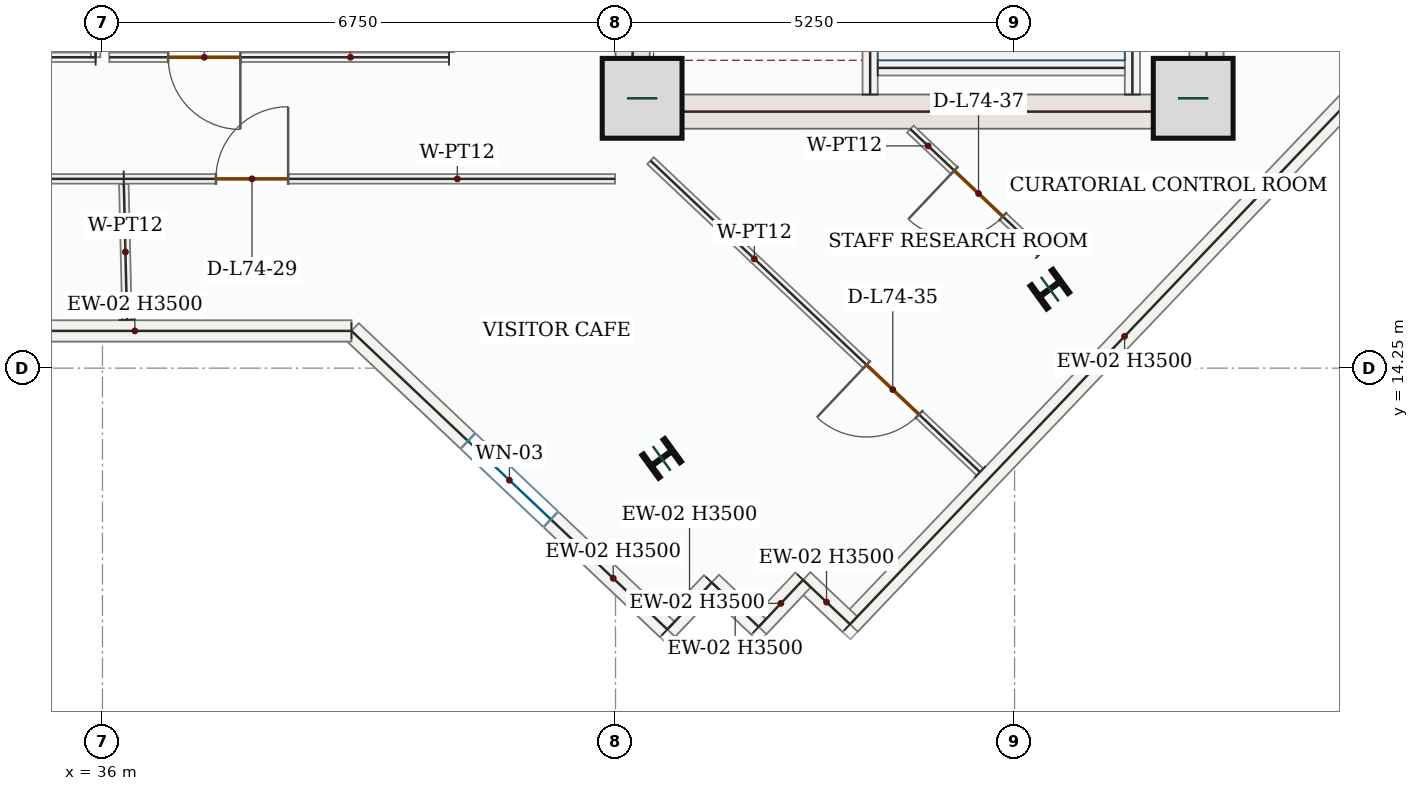
"""IFC4 building model, lengths in metres.
Left out: names, types, materials, properties, quantities, classifications, styles, units other than length and angle.
Written with IfcOpenShell. Run it as: python <this file> out.ifc"""

import sys

from ifc_helpers import new_model, si_unit, direction, frame, frame_2d, origin, origin_2d, place, context, subcontext, project, spatial, rectangle, i_section, extrude, source, transform, mapped, element, fill, save


model = new_model("IFC4")
c1 = context("Model", 3, precision=1e-05, world=origin(), true_north=direction((0.0, 1.0)))
c2 = subcontext(c1, "Body", "Model", "MODEL_VIEW")
j1 = project(units=[si_unit("LENGTHUNIT", "METRE"), si_unit("PLANEANGLEUNIT", "RADIAN")], contexts=[c1])
p1 = place(None, origin())
s1 = spatial("IfcSite", under=j1, at=p1, CompositionType="ELEMENT")
p2 = place(p1, origin())
s2 = spatial("IfcBuilding", under=s1, at=p2, CompositionType="ELEMENT")
p3 = place(p2, frame((0.0, 0.0, 306.6)))
s3 = spatial("IfcBuildingStorey", under=s2, at=p3, CompositionType="ELEMENT", Elevation=306.6)
p4 = place(p3, frame((42.975, 17.4, 0.0), z_axis=(0.0, 0.0, 1.0), x_axis=(0.0, 1.0, 0.0)))
e1 = element("IfcWall", 1, at=p4, inside=s3, PredefinedType="SHEAR", context=c2, shape_type="SweptSolid", body=[
    extrude(rectangle(XDim=8.55, YDim=0.45, at=frame_2d((4.275, 0.0))), origin(), (0.0, 0.0, 1.0), 3.5),
])
p5 = place(p4, frame((6.65, 0.0, 0.0)))
e2 = element("IfcOpeningElement", 2, at=p5, cuts=e1, PredefinedType="OPENING", context=c2, shape_type="SweptSolid", body=[
    extrude(rectangle(XDim=1.1, YDim=2.2, at=frame_2d((0.55, 1.1))), frame((0.0, 0.235, 0.0), z_axis=(0.0, -1.0, 0.0), x_axis=(1.0, 0.0, 0.0)), (0.0, 0.0, 1.0), 0.47),
])
p6 = place(p4, frame((1.75, 0.0, 0.0)))
e3 = element("IfcOpeningElement", 3, at=p6, cuts=e1, PredefinedType="OPENING", context=c2, shape_type="SweptSolid", body=[
    extrude(rectangle(XDim=1.3, YDim=2.2, at=frame_2d((0.65, 1.1))), frame((0.0, 0.235, 0.0), z_axis=(0.0, -1.0, 0.0), x_axis=(1.0, 0.0, 0.0)), (0.0, 0.0, 1.0), 0.47),
])
p7 = place(p4, frame((4.3, 0.0, 0.0)))
e4 = element("IfcOpeningElement", 4, at=p7, cuts=e1, PredefinedType="OPENING", context=c2, shape_type="SweptSolid", body=[
    extrude(rectangle(XDim=0.88, YDim=2.1, at=frame_2d((0.44, 1.05))), frame((0.0, 0.235, 0.0), z_axis=(0.0, -1.0, 0.0), x_axis=(1.0, 0.0, 0.0)), (0.0, 0.0, 1.0), 0.47),
])
m1 = source(origin(), c2, "Body", "SweptSolid", [
    extrude(rectangle(XDim=8.55, YDim=0.45, at=frame_2d((4.275, 0.0))), origin(), (0.0, 0.0, 1.0), 3.5),
])
p8 = place(p3, frame((50.525, 17.4, 0.0), z_axis=(0.0, 0.0, 1.0), x_axis=(0.0, 1.0, 0.0)))
e5 = element("IfcWall", 5, at=p8, inside=s3, PredefinedType="SHEAR", context=c2, shape_type="MappedRepresentation", body=[
    mapped(m1, transform((0.0, 0.0, 0.0), x_axis=(1.0, 0.0, 0.0), y_axis=(0.0, 1.0, 0.0), z_axis=(0.0, 0.0, 1.0), scale=1.0)),
])
m2 = source(origin(), c2, "Body", "SweptSolid", [
    extrude(rectangle(XDim=7.1, YDim=0.45, at=frame_2d((3.55, 0.0))), origin(), (0.0, 0.0, 1.0), 3.5),
])
p9 = place(p3, frame((43.2, 17.625, 0.0), z_axis=(0.0, 0.0, 1.0), x_axis=(1.0, 0.0, 0.0)))
e6 = element("IfcWall", 6, at=p9, inside=s3, PredefinedType="SHEAR", context=c2, shape_type="MappedRepresentation", body=[
    mapped(m2, transform((0.0, 0.0, 0.0), x_axis=(1.0, 0.0, 0.0), y_axis=(0.0, 1.0, 0.0), z_axis=(0.0, 0.0, 1.0), scale=1.0)),
])
m3 = source(origin(), c2, "Body", "SweptSolid", [
    extrude(rectangle(XDim=1.05, YDim=1.05, at=origin_2d()), origin(), (0.0, 0.0, 1.0), 3.75),
])
for number, where, z_axis, x_axis in (
    (7, (43.1, 17.8, 0.0), (0.0, 0.0, 1.0), (1.0, 0.0, 0.0)),
    (8, (50.35, 17.8, 0.0), (0.0, 0.0, 1.0), (1.0, 0.0, 0.0)),
):
    element("IfcColumn", number, at=place(p3, frame(where, z_axis=z_axis, x_axis=x_axis)), inside=s3, PredefinedType="COLUMN", context=c2, shape_type="MappedRepresentation", body=[
        mapped(m3, transform((0.0, 0.0, 0.0), x_axis=(1.0, 0.0, 0.0), y_axis=(0.0, 1.0, 0.0), z_axis=(0.0, 0.0, 1.0), scale=1.0)),
    ])
m4 = source(origin(), c2, "Body", "SweptSolid", [
    extrude(i_section(OverallWidth=0.374, OverallDepth=0.372, WebThickness=0.016, FlangeThickness=0.026, FilletRadius=0.018, at=origin_2d()), origin(), (0.0, 0.0, 1.0), 3.75),
])
for number, where, z_axis, x_axis in (
    (9, (43.357, 13.063, 0.0), (0.0, 0.0, 1.0), (-0.588, 0.809, 0.0)),
    (10, (48.464, 15.289, 0.0), (0.0, 0.0, 1.0), (-0.588, 0.809, 0.0)),
):
    element("IfcColumn", number, at=place(p3, frame(where, z_axis=z_axis, x_axis=x_axis)), inside=s3, PredefinedType="COLUMN", context=c2, shape_type="MappedRepresentation", body=[
        mapped(m4, transform((0.0, 0.0, 0.0), x_axis=(1.0, 0.0, 0.0), y_axis=(0.0, 1.0, 0.0), z_axis=(0.0, 0.0, 1.0), scale=1.0)),
    ])
m5 = source(origin(), c2, "Body", "SweptSolid", [
    extrude(rectangle(XDim=10.47, YDim=0.28, at=frame_2d((5.235, 0.0))), origin(), (0.0, 0.0, 1.0), 3.5),
])
p10 = place(p3, frame((53.06, 18.458, 0.0), z_axis=(0.0, 0.0, 1.0), x_axis=(-0.690070788875, -0.723741878256, 0.0)))
e11 = element("IfcWall", 11, at=p10, inside=s3, PredefinedType="SOLIDWALL", context=c2, shape_type="MappedRepresentation", body=[
    mapped(m5, transform((0.0, 0.0, 0.0), x_axis=(1.0, 0.0, 0.0), y_axis=(0.0, 1.0, 0.0), z_axis=(0.0, 0.0, 1.0), scale=1.0)),
])
m6 = source(origin(), c2, "Body", "SweptSolid", [
    extrude(rectangle(XDim=0.85, YDim=0.28, at=frame_2d((0.425, 0.0))), origin(), (0.0, 0.0, 1.0), 3.5),
])
p11 = place(p3, frame((45.835, 10.88, 0.0), z_axis=(0.0, 0.0, 1.0), x_axis=(-0.726790047388, 0.686859685101, 0.0)))
e12 = element("IfcWall", 12, at=p11, inside=s3, PredefinedType="SOLIDWALL", context=c2, shape_type="MappedRepresentation", body=[
    mapped(m6, transform((0.0, 0.0, 0.0), x_axis=(1.0, 0.0, 0.0), y_axis=(0.0, 1.0, 0.0), z_axis=(0.0, 0.0, 1.0), scale=1.0)),
])
m7 = source(origin(), c2, "Body", "SweptSolid", [
    extrude(rectangle(XDim=0.85, YDim=0.28, at=frame_2d((0.425, 0.0))), origin(), (0.0, 0.0, 1.0), 3.5),
])
p12 = place(p3, frame((45.217, 11.464, 0.0), z_axis=(0.0, 0.0, 1.0), x_axis=(-0.687011382404, -0.726646654466, 0.0)))
e13 = element("IfcWall", 13, at=p12, inside=s3, PredefinedType="SOLIDWALL", context=c2, shape_type="MappedRepresentation", body=[
    mapped(m7, transform((0.0, 0.0, 0.0), x_axis=(1.0, 0.0, 0.0), y_axis=(0.0, 1.0, 0.0), z_axis=(0.0, 0.0, 1.0), scale=1.0)),
])
p13 = place(p3, frame((44.633, 10.846, 0.0), z_axis=(0.0, 0.0, 1.0), x_axis=(-0.726790047388, 0.686859685101, 0.0)))
e14 = element("IfcWall", 14, at=p13, inside=s3, PredefinedType="SOLIDWALL", context=c2, shape_type="MappedRepresentation", body=[
    mapped(m6, transform((0.0, 0.0, 0.0), x_axis=(1.0, 0.0, 0.0), y_axis=(0.0, 1.0, 0.0), z_axis=(0.0, 0.0, 1.0), scale=1.0)),
])
p14 = place(p3, frame((44.016, 11.43, 0.0), z_axis=(0.0, 0.0, 1.0), x_axis=(-0.687011382404, -0.726646654466, 0.0)))
e15 = element("IfcWall", 15, at=p14, inside=s3, PredefinedType="SOLIDWALL", context=c2, shape_type="MappedRepresentation", body=[
    mapped(m7, transform((0.0, 0.0, 0.0), x_axis=(1.0, 0.0, 0.0), y_axis=(0.0, 1.0, 0.0), z_axis=(0.0, 0.0, 1.0), scale=1.0)),
])
p15 = place(p3, frame((43.432, 10.812, 0.0), z_axis=(0.0, 0.0, 1.0), x_axis=(-0.726765623086, 0.686885528382, 0.0)))
e16 = element("IfcWall", 16, at=p15, inside=s3, PredefinedType="SOLIDWALL", context=c2, shape_type="SweptSolid", body=[
    extrude(rectangle(XDim=5.718, YDim=0.28, at=frame_2d((2.859, 0.0))), origin(), (0.0, 0.0, 1.0), 3.5),
])
p16 = place(p15, frame((2.109, 0.0, 0.85)))
e17 = element("IfcOpeningElement", 17, at=p16, cuts=e16, PredefinedType="OPENING", context=c2, shape_type="SweptSolid", body=[
    extrude(rectangle(XDim=1.5, YDim=1.5, at=frame_2d((0.75, 0.75))), frame((0.0, 0.15, 0.0), z_axis=(0.0, -1.0, 0.0), x_axis=(1.0, 0.0, 0.0)), (0.0, 0.0, 1.0), 0.3),
])
m8 = source(origin(), c2, "Body", "SweptSolid", [
    extrude(rectangle(XDim=5.699, YDim=0.28, at=frame_2d((2.85, 0.0))), origin(), (0.0, 0.0, 1.0), 3.5),
])
p17 = place(p3, frame((39.276, 14.74, 0.0), z_axis=(0.0, 0.0, 1.0), x_axis=(-1.0, 0.0, 0.0)))
e18 = element("IfcWall", 18, at=p17, inside=s3, PredefinedType="SOLIDWALL", context=c2, shape_type="MappedRepresentation", body=[
    mapped(m8, transform((0.0, 0.0, 0.0), x_axis=(1.0, 0.0, 0.0), y_axis=(0.0, 1.0, 0.0), z_axis=(0.0, 0.0, 1.0), scale=1.0)),
])
m9 = source(origin(), c2, "Body", "SweptSolid", [
    extrude(rectangle(XDim=7.87, YDim=0.2, at=frame_2d((3.935, 0.0))), origin(), (0.0, 0.0, 1.0), 3.5),
])
p18 = place(p3, frame((49.55, 17.85, 0.0), z_axis=(0.0, 0.0, 1.0), x_axis=(0.0, 1.0, 0.0)))
e19 = element("IfcWall", 19, at=p18, inside=s3, PredefinedType="SOLIDWALL", context=c2, shape_type="MappedRepresentation", body=[
    mapped(m9, transform((0.0, 0.0, 0.0), x_axis=(1.0, 0.0, 0.0), y_axis=(0.0, 1.0, 0.0), z_axis=(0.0, 0.0, 1.0), scale=1.0)),
])
p19 = place(p3, frame((46.1, 17.85, 0.0), z_axis=(0.0, 0.0, 1.0), x_axis=(0.0, 1.0, 0.0)))
e20 = element("IfcWall", 20, at=p19, inside=s3, PredefinedType="SOLIDWALL", context=c2, shape_type="SweptSolid", body=[
    extrude(rectangle(XDim=8.0, YDim=0.2, at=frame_2d((4.0, 0.0))), origin(), (0.0, 0.0, 1.0), 3.5),
])
p20 = place(p19, frame((6.3, 0.0, 0.0)))
e21 = element("IfcOpeningElement", 21, at=p20, cuts=e20, PredefinedType="OPENING", context=c2, shape_type="SweptSolid", body=[
    extrude(rectangle(XDim=1.05, YDim=2.15, at=frame_2d((0.525, 1.075))), frame((0.0, 0.11, 0.0), z_axis=(0.0, -1.0, 0.0), x_axis=(1.0, 0.0, 0.0)), (0.0, 0.0, 1.0), 0.22),
])
m10 = source(origin(), c2, "Body", "SweptSolid", [
    extrude(rectangle(XDim=3.25, YDim=0.2, at=frame_2d((1.625, 0.0))), origin(), (0.0, 0.0, 1.0), 3.5),
])
p21 = place(p3, frame((46.2, 18.2, 0.0), z_axis=(0.0, 0.0, 1.0), x_axis=(1.0, 0.0, 0.0)))
e22 = element("IfcWall", 22, at=p21, inside=s3, PredefinedType="SOLIDWALL", context=c2, shape_type="MappedRepresentation", body=[
    mapped(m10, transform((0.0, 0.0, 0.0), x_axis=(1.0, 0.0, 0.0), y_axis=(0.0, 1.0, 0.0), z_axis=(0.0, 0.0, 1.0), scale=1.0)),
])
p22 = place(p3, frame((48.349, 15.769, 0.0), z_axis=(0.0, 0.0, 1.0), x_axis=(-0.726735597886, 0.686917295433, 0.0)))
e23 = element("IfcWall", 23, at=p22, inside=s3, PredefinedType="PARTITIONING", context=c2, shape_type="SweptSolid", body=[
    extrude(rectangle(XDim=2.367, YDim=0.125, at=frame_2d((1.183, 0.0))), origin(), (0.0, 0.0, 1.0), 3.5),
])
p23 = place(p22, frame((0.692, 0.0, 0.0)))
e24 = element("IfcOpeningElement", 24, at=p23, cuts=e23, PredefinedType="OPENING", context=c2, shape_type="SweptSolid", body=[
    extrude(rectangle(XDim=0.88, YDim=2.1, at=frame_2d((0.44, 1.05))), frame((0.0, 0.073, 0.0), z_axis=(0.0, -1.0, 0.0), x_axis=(1.0, 0.0, 0.0)), (0.0, 0.0, 1.0), 0.145),
])
p24 = place(p3, frame((47.544, 12.883, 0.0), z_axis=(0.0, 0.0, 1.0), x_axis=(-0.726761082497, 0.686890332562, 0.0)))
e25 = element("IfcWall", 25, at=p24, inside=s3, PredefinedType="PARTITIONING", context=c2, shape_type="SweptSolid", body=[
    extrude(rectangle(XDim=5.964, YDim=0.125, at=frame_2d((2.982, 0.0))), origin(), (0.0, 0.0, 1.0), 3.5),
])
p25 = place(p24, frame((1.103, 0.0, 0.0)))
e26 = element("IfcOpeningElement", 26, at=p25, cuts=e25, PredefinedType="OPENING", context=c2, shape_type="SweptSolid", body=[
    extrude(rectangle(XDim=0.95, YDim=2.15, at=frame_2d((0.475, 1.075))), frame((0.0, 0.073, 0.0), z_axis=(0.0, -1.0, 0.0), x_axis=(1.0, 0.0, 0.0)), (0.0, 0.0, 1.0), 0.145),
])
p26 = place(p3, frame((35.91, 18.34, 0.0), z_axis=(0.0, 0.0, 1.0), x_axis=(-1.0, 0.0, 0.0)))
e27 = element("IfcWall", 27, at=p26, inside=s3, PredefinedType="PARTITIONING", context=c2, shape_type="SweptSolid", body=[
    extrude(rectangle(XDim=4.47, YDim=0.125, at=frame_2d((2.235, 0.0))), origin(), (0.0, 0.0, 1.0), 3.5),
])
p27 = place(p26, frame((0.774, 0.0, 0.0)))
e28 = element("IfcOpeningElement", 28, at=p27, cuts=e27, PredefinedType="OPENING", context=c2, shape_type="SweptSolid", body=[
    extrude(rectangle(XDim=0.95, YDim=2.15, at=frame_2d((0.475, 1.075))), frame((0.0, 0.073, 0.0), z_axis=(0.0, -1.0, 0.0), x_axis=(1.0, 0.0, 0.0)), (0.0, 0.0, 1.0), 0.145),
])
m11 = source(origin(), c2, "Body", "SweptSolid", [
    extrude(rectangle(XDim=3.67, YDim=0.125, at=frame_2d((1.835, 0.0))), origin(), (0.0, 0.0, 1.0), 3.5),
])
p28 = place(p3, frame((35.91, 22.01, 0.0), z_axis=(0.0, 0.0, 1.0), x_axis=(0.0, -1.0, 0.0)))
e29 = element("IfcWall", 29, at=p28, inside=s3, PredefinedType="PARTITIONING", context=c2, shape_type="MappedRepresentation", body=[
    mapped(m11, transform((0.0, 0.0, 0.0), x_axis=(1.0, 0.0, 0.0), y_axis=(0.0, 1.0, 0.0), z_axis=(0.0, 0.0, 1.0), scale=1.0)),
])
p29 = place(p3, frame((40.56, 18.34, 0.0), z_axis=(0.0, 0.0, 1.0), x_axis=(-1.0, 0.0, 0.0)))
e30 = element("IfcWall", 30, at=p29, inside=s3, PredefinedType="PARTITIONING", context=c2, shape_type="SweptSolid", body=[
    extrude(rectangle(XDim=4.47, YDim=0.125, at=frame_2d((2.235, 0.0))), origin(), (0.0, 0.0, 1.0), 3.5),
])
p30 = place(p29, frame((2.746, 0.0, 0.0)))
e31 = element("IfcOpeningElement", 31, at=p30, cuts=e30, PredefinedType="OPENING", context=c2, shape_type="SweptSolid", body=[
    extrude(rectangle(XDim=0.95, YDim=2.15, at=frame_2d((0.475, 1.075))), frame((0.0, 0.073, 0.0), z_axis=(0.0, -1.0, 0.0), x_axis=(1.0, 0.0, 0.0)), (0.0, 0.0, 1.0), 0.145),
])
p31 = place(p3, frame((36.28, 16.74, 0.0), z_axis=(0.0, 0.0, 1.0), x_axis=(1.0, 0.0, 0.0)))
e32 = element("IfcWall", 32, at=p31, inside=s3, PredefinedType="PARTITIONING", context=c2, shape_type="SweptSolid", body=[
    extrude(rectangle(XDim=6.464, YDim=0.125, at=frame_2d((3.232, 0.0))), origin(), (0.0, 0.0, 1.0), 3.5),
])
p32 = place(p31, frame((1.213, 0.0, 0.0)))
e33 = element("IfcOpeningElement", 33, at=p32, cuts=e32, PredefinedType="OPENING", context=c2, shape_type="SweptSolid", body=[
    extrude(rectangle(XDim=0.95, YDim=2.15, at=frame_2d((0.475, 1.075))), frame((0.0, 0.073, 0.0), z_axis=(0.0, -1.0, 0.0), x_axis=(1.0, 0.0, 0.0)), (0.0, 0.0, 1.0), 0.145),
])
m12 = source(origin(), c2, "Body", "SweptSolid", [
    extrude(rectangle(XDim=1.788, YDim=0.125, at=frame_2d((0.894, 0.0))), origin(), (0.0, 0.0, 1.0), 3.5),
])
p33 = place(p3, frame((36.323, 14.885, 0.0), z_axis=(0.0, 0.0, 1.0), x_axis=(-0.023484370815, 0.999724204132, 0.0)))
e34 = element("IfcWall", 34, at=p33, inside=s3, PredefinedType="PARTITIONING", context=c2, shape_type="MappedRepresentation", body=[
    mapped(m12, transform((0.0, 0.0, 0.0), x_axis=(1.0, 0.0, 0.0), y_axis=(0.0, 1.0, 0.0), z_axis=(0.0, 0.0, 1.0), scale=1.0)),
])
p34 = place(p3, frame((29.399, 16.74, 0.0), z_axis=(0.0, 0.0, 1.0), x_axis=(1.0, 0.0, 0.0)))
e35 = element("IfcWall", 35, at=p34, inside=s3, PredefinedType="PARTITIONING", context=c2, shape_type="SweptSolid", body=[
    extrude(rectangle(XDim=6.881, YDim=0.125, at=frame_2d((3.44, 0.0))), origin(), (0.0, 0.0, 1.0), 3.5),
])
p35 = place(p34, frame((4.626, 0.0, 0.0)))
e36 = element("IfcOpeningElement", 36, at=p35, cuts=e35, PredefinedType="OPENING", context=c2, shape_type="SweptSolid", body=[
    extrude(rectangle(XDim=0.95, YDim=2.15, at=frame_2d((0.475, 1.075))), frame((0.0, 0.073, 0.0), z_axis=(0.0, -1.0, 0.0), x_axis=(1.0, 0.0, 0.0)), (0.0, 0.0, 1.0), 0.145),
])
m13 = source(origin(), c2, "Body", "SweptSolid", [
    extrude(rectangle(XDim=1.5, YDim=1.5, at=frame_2d((0.75, 0.75))), frame((0.0, 0.03, 0.0), z_axis=(0.0, -1.0, 0.0), x_axis=(1.0, 0.0, 0.0)), (0.0, 0.0, 1.0), 0.06),
])
p36 = place(p16, origin())
e37 = element("IfcWindow", 37, at=p36, inside=s3, PartitioningType="SINGLE_PANEL", PredefinedType="WINDOW", context=c2, shape_type="MappedRepresentation", body=[
    mapped(m13, transform((0.0, 0.0, 0.0), x_axis=(1.0, 0.0, 0.0), y_axis=(0.0, 1.0, 0.0), z_axis=(0.0, 0.0, 1.0), scale=1.0)),
])
fill(e17, e37)
m14 = source(origin(), c2, "Body", "SweptSolid", [
    extrude(rectangle(XDim=0.95, YDim=2.15, at=frame_2d((0.475, 1.075))), frame((0.0, 0.025, 0.0), z_axis=(0.0, -1.0, 0.0), x_axis=(1.0, 0.0, 0.0)), (0.0, 0.0, 1.0), 0.05),
])
p37 = place(p30, origin())
e38 = element("IfcDoor", 38, at=p37, inside=s3, OperationType="SINGLE_SWING_LEFT", PredefinedType="DOOR", context=c2, shape_type="MappedRepresentation", body=[
    mapped(m14, transform((0.0, 0.0, 0.0), x_axis=(1.0, 0.0, 0.0), y_axis=(0.0, 1.0, 0.0), z_axis=(0.0, 0.0, 1.0), scale=1.0)),
])
fill(e31, e38)
p38 = place(p32, origin())
e39 = element("IfcDoor", 39, at=p38, inside=s3, OperationType="SINGLE_SWING_RIGHT", PredefinedType="DOOR", context=c2, shape_type="MappedRepresentation", body=[
    mapped(m14, transform((0.0, 0.0, 0.0), x_axis=(1.0, 0.0, 0.0), y_axis=(0.0, 1.0, 0.0), z_axis=(0.0, 0.0, 1.0), scale=1.0)),
])
fill(e33, e39)
p39 = place(p25, origin())
e40 = element("IfcDoor", 40, at=p39, inside=s3, OperationType="SINGLE_SWING_RIGHT", PredefinedType="DOOR", context=c2, shape_type="MappedRepresentation", body=[
    mapped(m14, transform((0.0, 0.0, 0.0), x_axis=(1.0, 0.0, 0.0), y_axis=(0.0, 1.0, 0.0), z_axis=(0.0, 0.0, 1.0), scale=1.0)),
])
fill(e26, e40)
m15 = source(origin(), c2, "Body", "SweptSolid", [
    extrude(rectangle(XDim=0.88, YDim=2.1, at=frame_2d((0.44, 1.05))), frame((0.0, 0.025, 0.0), z_axis=(0.0, -1.0, 0.0), x_axis=(1.0, 0.0, 0.0)), (0.0, 0.0, 1.0), 0.05),
])
p40 = place(p23, origin())
e41 = element("IfcDoor", 41, at=p40, inside=s3, OperationType="SINGLE_SWING_RIGHT", PredefinedType="DOOR", context=c2, shape_type="MappedRepresentation", body=[
    mapped(m15, transform((0.0, 0.0, 0.0), x_axis=(1.0, 0.0, 0.0), y_axis=(0.0, 1.0, 0.0), z_axis=(0.0, 0.0, 1.0), scale=1.0)),
])
fill(e24, e41)
save(model, sys.argv[1])
